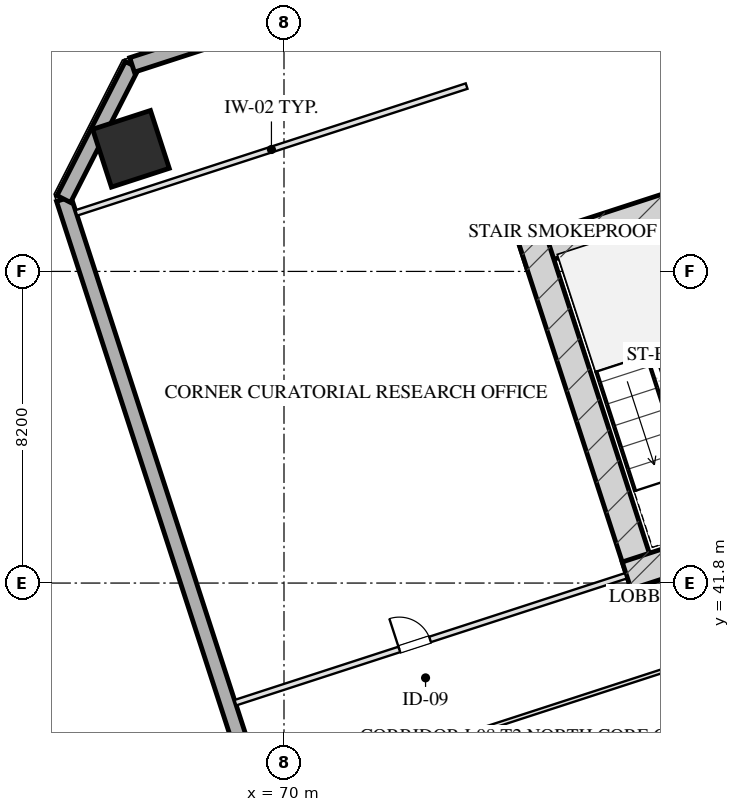
"""IFC4 building model, lengths in metres.
Left out: names, types, materials, properties, quantities, classifications, styles, units other than length and angle.
Written with IfcOpenShell. Run it as: python <this file> out.ifc"""

import sys

from ifc_helpers import new_model, si_unit, direction, frame, frame_2d, origin, origin_2d, place, context, subcontext, project, spatial, rectangle, hollow_rectangle, extrude, element, fill, save


model = new_model("IFC4")
c1 = context("Model", 3, precision=1e-05, world=origin(), true_north=direction((0.0, 1.0)))
c2 = subcontext(c1, "Body", "Model", "MODEL_VIEW")
j1 = project(units=[si_unit("LENGTHUNIT", "METRE"), si_unit("PLANEANGLEUNIT", "RADIAN")], contexts=[c1])
p1 = place(None, origin())
s1 = spatial("IfcSite", under=j1, at=p1, CompositionType="ELEMENT")
p2 = place(p1, origin())
s2 = spatial("IfcBuilding", under=s1, at=p2, CompositionType="ELEMENT")
p3 = place(p2, frame((0.0, 0.0, 38.0)))
s3 = spatial("IfcBuildingStorey", under=s2, at=p3, CompositionType="ELEMENT", Elevation=38.0)
p4 = place(p3, frame((76.272, 50.443, 0.0), z_axis=(0.0, 0.0, 1.0), x_axis=(0.951056072937, 0.309018358888, 0.0)))
e1 = element("IfcWall", 1, at=p4, inside=s3, PredefinedType="SHEAR", context=c2, shape_type="SweptSolid", body=[
    extrude(rectangle(XDim=16.55, YDim=0.75, at=frame_2d((8.275, 0.0))), origin(), (0.0, 0.0, 1.0), 4.0),
])
p5 = place(p3, frame((79.489, 41.756, 0.0), z_axis=(0.0, 0.0, 1.0), x_axis=(-0.309016134813, 0.951056795583, 0.0)))
e2 = element("IfcWall", 2, at=p5, inside=s3, PredefinedType="SHEAR", context=c2, shape_type="SweptSolid", body=[
    extrude(rectangle(XDim=9.63, YDim=0.75, at=frame_2d((4.815, 0.0))), origin(), (0.0, 0.0, 1.0), 4.0),
])
p6 = place(p3, frame((79.016, 41.997, 0.0), z_axis=(0.0, 0.0, 1.0), x_axis=(0.95106038264, 0.309005094736, 0.0)))
e3 = element("IfcWall", 3, at=p6, inside=s3, PredefinedType="SHEAR", context=c2, shape_type="SweptSolid", body=[
    extrude(rectangle(XDim=4.295, YDim=0.75, at=frame_2d((2.147, 0.0))), origin(), (0.0, 0.0, 1.0), 4.0),
])
p7 = place(p3, frame((65.973, 53.226, 0.0), z_axis=(0.0, 0.0, 1.0), x_axis=(0.951056516295, 0.309016994375, 0.0)))
e4 = element("IfcColumn", 4, at=p7, inside=s3, PredefinedType="COLUMN", context=c2, shape_type="SweptSolid", body=[
    extrude(hollow_rectangle(XDim=1.6, YDim=1.6, WallThickness=0.055, at=origin_2d()), origin(), (0.0, 0.0, 1.0), 4.001),
])
p8 = place(p3, frame((79.655, 4.352, 0.0), z_axis=(0.0, 0.0, 1.0), x_axis=(-0.309014526607, 0.951057318118, 0.0)))
e5 = element("IfcWall", 5, at=p8, inside=s3, PredefinedType="SOLIDWALL", context=c2, shape_type="SweptSolid", body=[
    extrude(rectangle(XDim=50.0, YDim=0.4, at=frame_2d((25.0, 0.0))), origin(), (0.0, 0.0, 1.0), 3.16),
])
p9 = place(p8, frame((21.85, 0.0, 0.0)))
e6 = element("IfcOpeningElement", 6, at=p9, cuts=e5, PredefinedType="OPENING", context=c2, shape_type="SweptSolid", body=[
    extrude(rectangle(XDim=1.1, YDim=2.15, at=frame_2d((0.55, 1.075))), frame((0.0, 0.21, 0.0), z_axis=(0.0, -1.0, 0.0), x_axis=(1.0, 0.0, 0.0)), (0.0, 0.0, 1.0), 0.42),
])
p10 = place(p3, frame((64.205, 51.905, 0.0), z_axis=(0.0, 0.0, 1.0), x_axis=(0.453958106755, 0.891023028497, 0.0)))
e7 = element("IfcWall", 7, at=p10, inside=s3, PredefinedType="SOLIDWALL", context=c2, shape_type="SweptSolid", body=[
    extrude(rectangle(XDim=3.96, YDim=0.4, at=frame_2d((1.98, 0.0))), origin(), (0.0, 0.0, 1.0), 3.16),
])
p11 = place(p3, frame((66.002, 55.433, 0.0), z_axis=(0.0, 0.0, 1.0), x_axis=(0.951055939317, 0.309018770125, 0.0)))
e8 = element("IfcWall", 8, at=p11, inside=s3, PredefinedType="SOLIDWALL", context=c2, shape_type="SweptSolid", body=[
    extrude(rectangle(XDim=32.4, YDim=0.4, at=frame_2d((16.2, 0.0))), origin(), (0.0, 0.0, 1.0), 3.16),
])
p12 = place(p3, frame((64.534, 51.539, 0.0), z_axis=(0.0, 0.0, 1.0), x_axis=(0.951056658866, 0.309016555588, 0.0)))
e9 = element("IfcWall", 9, at=p12, inside=s3, PredefinedType="PARTITIONING", context=c2, shape_type="SweptSolid", body=[
    extrude(rectangle(XDim=10.8, YDim=0.15, at=frame_2d((5.4, 0.0))), origin(), (0.0, 0.0, 1.0), 3.725),
])
p13 = place(p3, frame((68.721, 38.652, 0.0), z_axis=(0.0, 0.0, 1.0), x_axis=(0.951056658866, 0.309016555588, 0.0)))
e10 = element("IfcWall", 10, at=p13, inside=s3, PredefinedType="PARTITIONING", context=c2, shape_type="SweptSolid", body=[
    extrude(rectangle(XDim=10.8, YDim=0.15, at=frame_2d((5.4, 0.0))), origin(), (0.0, 0.0, 1.0), 3.725),
])
p14 = place(p13, frame((4.536, 0.0, 0.0)))
e11 = element("IfcOpeningElement", 11, at=p14, cuts=e10, PredefinedType="OPENING", context=c2, shape_type="SweptSolid", body=[
    extrude(rectangle(XDim=0.85, YDim=2.05, at=frame_2d((0.425, 1.025))), frame((0.0, 0.085, 0.0), z_axis=(0.0, -1.0, 0.0), x_axis=(1.0, 0.0, 0.0)), (0.0, 0.0, 1.0), 0.17),
])
for number, where, z_axis, x_axis in (
    (12, (69.549, 36.103, 0.0), (0.0, 0.0, 1.0), (0.951, 0.309, 0.0)),
    (13, (70.575, 32.946, 0.0), (0.0, 0.0, 1.0), (0.951, 0.309, 0.0)),
):
    element("IfcWall", number, at=place(p3, frame(where, z_axis=z_axis, x_axis=x_axis)), inside=s3, PredefinedType="MOVABLE", context=c2, shape_type="SweptSolid", body=[
        extrude(rectangle(XDim=18.075, YDim=0.1, at=frame_2d((9.038, 0.0))), origin(), (0.0, 0.0, 1.0), 3.725),
    ])
p15 = place(p14, origin())
e14 = element("IfcDoor", 14, at=p15, inside=s3, OperationType="SINGLE_SWING_LEFT", PredefinedType="DOOR", context=c2, shape_type="SweptSolid", body=[
    extrude(rectangle(XDim=0.85, YDim=2.05, at=frame_2d((0.425, 1.025))), frame((0.0, 0.025, 0.0), z_axis=(0.0, -1.0, 0.0), x_axis=(1.0, 0.0, 0.0)), (0.0, 0.0, 1.0), 0.05),
])
fill(e11, e14)
save(model, sys.argv[1])
